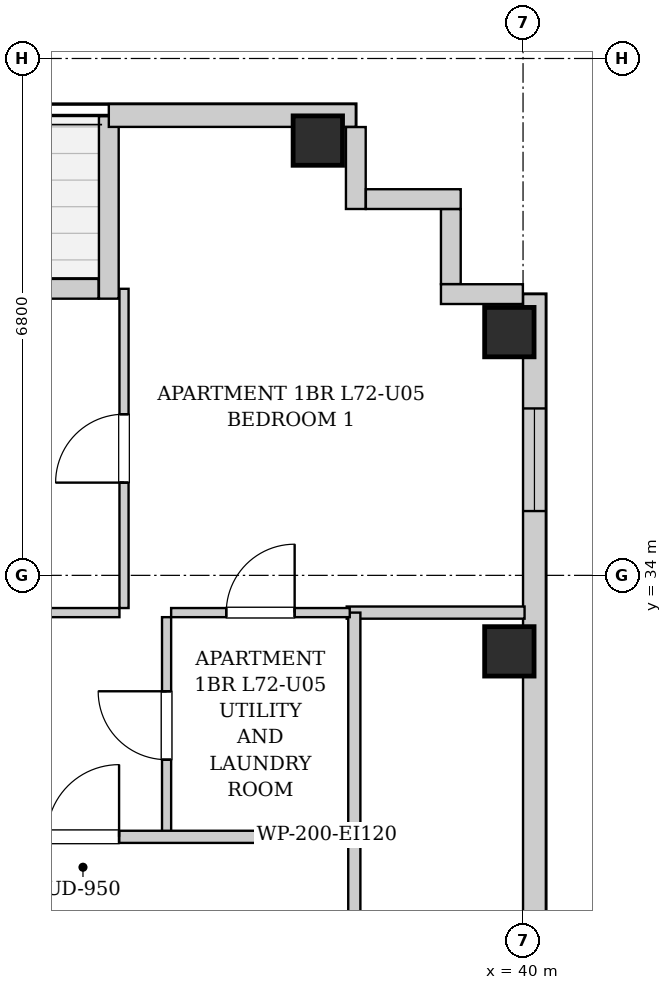
"""IFC4 building model, lengths in metres.
Left out: names, types, materials, properties, quantities, classifications, styles, units other than length and angle.
Written with IfcOpenShell. Run it as: python <this file> out.ifc"""

import sys

from ifc_helpers import new_model, si_unit, direction, frame, frame_2d, origin, origin_2d, place, context, subcontext, project, spatial, rectangle, extrude, element, fill, save


model = new_model("IFC4")
c1 = context("Model", 3, precision=1e-05, world=origin(), true_north=direction((0.0, 1.0)))
c2 = subcontext(c1, "Body", "Model", "MODEL_VIEW")
j1 = project(units=[si_unit("LENGTHUNIT", "METRE"), si_unit("PLANEANGLEUNIT", "RADIAN")], contexts=[c1])
p1 = place(None, origin())
s1 = spatial("IfcSite", under=j1, at=p1, CompositionType="ELEMENT")
p2 = place(p1, origin())
s2 = spatial("IfcBuilding", under=s1, at=p2, CompositionType="ELEMENT")
p3 = place(p2, frame((0.0, 0.0, 247.9)))
s3 = spatial("IfcBuildingStorey", under=s2, at=p3, CompositionType="ELEMENT", Elevation=247.9)
for number, where, z_axis, x_axis in (
    (1, (37.3, 39.72, 0.0), (0.0, 0.0, 1.0), (1.0, 0.0, 0.0)),
    (2, (39.82, 33.0, 0.0), (0.0, 0.0, 1.0), (1.0, 0.0, 0.0)),
    (3, (39.82, 37.2, 0.0), (0.0, 0.0, 1.0), (1.0, 0.0, 0.0)),
):
    element("IfcColumn", number, at=place(p3, frame(where, z_axis=z_axis, x_axis=x_axis)), inside=s3, PredefinedType="COLUMN", context=c2, shape_type="SweptSolid", body=[
        extrude(rectangle(XDim=0.65, YDim=0.65, at=origin_2d()), origin(), (0.0, 0.0, 1.0), 3.4),
    ])
p4 = place(p3, frame((30.084, 37.77, 0.0), z_axis=(0.0, 0.0, 1.0), x_axis=(1.0, 0.0, 0.0)))
e4 = element("IfcWall", 4, at=p4, inside=s3, PredefinedType="SOLIDWALL", context=c2, shape_type="SweptSolid", body=[
    extrude(rectangle(XDim=4.332, YDim=0.26, at=frame_2d((2.166, 0.0))), origin(), (0.0, 0.0, 1.0), 3.14),
])
p5 = place(p4, frame((1.616, 0.0, 0.0)))
e5 = element("IfcOpeningElement", 5, at=p5, cuts=e4, PredefinedType="OPENING", context=c2, shape_type="SweptSolid", body=[
    extrude(rectangle(XDim=1.1, YDim=2.0, at=frame_2d((0.55, 1.0))), frame((0.0, 0.14, 0.0), z_axis=(0.0, -1.0, 0.0), x_axis=(1.0, 0.0, 0.0)), (0.0, 0.0, 1.0), 0.28),
])
p6 = place(p4, frame((0.606, 0.0, 0.55)))
e6 = element("IfcOpeningElement", 6, at=p6, cuts=e4, PredefinedType="OPENING", context=c2, shape_type="SweptSolid", body=[
    extrude(rectangle(XDim=0.85, YDim=1.2, at=frame_2d((0.425, 0.6))), frame((0.0, 0.14, 0.0), z_axis=(0.0, -1.0, 0.0), x_axis=(1.0, 0.0, 0.0)), (0.0, 0.0, 1.0), 0.28),
])
p7 = place(p3, frame((34.55, 37.64, 0.0), z_axis=(0.0, 0.0, 1.0), x_axis=(0.0, 1.0, 0.0)))
e7 = element("IfcWall", 7, at=p7, inside=s3, PredefinedType="SOLIDWALL", context=c2, shape_type="SweptSolid", body=[
    extrude(rectangle(XDim=2.4, YDim=0.26, at=frame_2d((1.2, 0.0))), origin(), (0.0, 0.0, 1.0), 3.14),
])
p8 = place(p3, frame((34.55, 40.05, 0.0), z_axis=(0.0, 0.0, 1.0), x_axis=(1.0, 0.0, 0.0)))
e8 = element("IfcWall", 8, at=p8, inside=s3, PredefinedType="SOLIDWALL", context=c2, shape_type="SweptSolid", body=[
    extrude(rectangle(XDim=3.25, YDim=0.3, at=frame_2d((1.625, 0.0))), origin(), (0.0, 0.0, 1.0), 3.14),
])
p9 = place(p3, frame((40.15, 37.7, 0.0), z_axis=(0.0, 0.0, 1.0), x_axis=(0.0, -1.0, 0.0)))
e9 = element("IfcWall", 9, at=p9, inside=s3, PredefinedType="SOLIDWALL", context=c2, shape_type="SweptSolid", body=[
    extrude(rectangle(XDim=31.4, YDim=0.3, at=frame_2d((15.7, 0.0))), origin(), (0.0, 0.0, 1.0), 3.14),
])
p10 = place(p9, frame((28.546, 0.0, 0.55)))
e10 = element("IfcOpeningElement", 10, at=p10, cuts=e9, PredefinedType="OPENING", context=c2, shape_type="SweptSolid", body=[
    extrude(rectangle(XDim=1.35, YDim=1.2, at=frame_2d((0.675, 0.6))), frame((0.0, 0.16, 0.0), z_axis=(0.0, -1.0, 0.0), x_axis=(1.0, 0.0, 0.0)), (0.0, 0.0, 1.0), 0.32),
])
p11 = place(p9, frame((1.504, 0.0, 0.55)))
e11 = element("IfcOpeningElement", 11, at=p11, cuts=e9, PredefinedType="OPENING", context=c2, shape_type="SweptSolid", body=[
    extrude(rectangle(XDim=1.35, YDim=1.2, at=frame_2d((0.675, 0.6))), frame((0.0, 0.16, 0.0), z_axis=(0.0, -1.0, 0.0), x_axis=(1.0, 0.0, 0.0)), (0.0, 0.0, 1.0), 0.32),
])
p12 = place(p9, frame((19.683, 0.0, 0.55)))
e12 = element("IfcOpeningElement", 12, at=p12, cuts=e9, PredefinedType="OPENING", context=c2, shape_type="SweptSolid", body=[
    extrude(rectangle(XDim=1.35, YDim=1.2, at=frame_2d((0.675, 0.6))), frame((0.0, 0.16, 0.0), z_axis=(0.0, -1.0, 0.0), x_axis=(1.0, 0.0, 0.0)), (0.0, 0.0, 1.0), 0.32),
])
p13 = place(p9, frame((10.367, 0.0, 0.55)))
e13 = element("IfcOpeningElement", 13, at=p13, cuts=e9, PredefinedType="OPENING", context=c2, shape_type="SweptSolid", body=[
    extrude(rectangle(XDim=1.35, YDim=1.2, at=frame_2d((0.675, 0.6))), frame((0.0, 0.16, 0.0), z_axis=(0.0, -1.0, 0.0), x_axis=(1.0, 0.0, 0.0)), (0.0, 0.0, 1.0), 0.32),
])
p14 = place(p3, frame((37.8, 39.898, 0.0), z_axis=(0.0, 0.0, 1.0), x_axis=(0.0, -1.0, 0.0)))
e14 = element("IfcWall", 14, at=p14, inside=s3, PredefinedType="SOLIDWALL", context=c2, shape_type="SweptSolid", body=[
    extrude(rectangle(XDim=1.078, YDim=0.26, at=frame_2d((0.539, 0.0))), origin(), (0.0, 0.0, 1.0), 3.14),
])
p15 = place(p3, frame((37.932, 38.95, 0.0), z_axis=(0.0, 0.0, 1.0), x_axis=(1.0, 0.0, 0.0)))
e15 = element("IfcWall", 15, at=p15, inside=s3, PredefinedType="SOLIDWALL", context=c2, shape_type="SweptSolid", body=[
    extrude(rectangle(XDim=1.248, YDim=0.26, at=frame_2d((0.624, 0.0))), origin(), (0.0, 0.0, 1.0), 3.14),
])
p16 = place(p3, frame((39.05, 38.818, 0.0), z_axis=(0.0, 0.0, 1.0), x_axis=(0.0, -1.0, 0.0)))
e16 = element("IfcWall", 16, at=p16, inside=s3, PredefinedType="SOLIDWALL", context=c2, shape_type="SweptSolid", body=[
    extrude(rectangle(XDim=0.986, YDim=0.26, at=frame_2d((0.493, 0.0))), origin(), (0.0, 0.0, 1.0), 3.14),
])
p17 = place(p3, frame((38.92, 37.7, 0.0), z_axis=(0.0, 0.0, 1.0), x_axis=(1.0, 0.0, 0.0)))
e17 = element("IfcWall", 17, at=p17, inside=s3, PredefinedType="SOLIDWALL", context=c2, shape_type="SweptSolid", body=[
    extrude(rectangle(XDim=1.078, YDim=0.26, at=frame_2d((0.539, 0.0))), origin(), (0.0, 0.0, 1.0), 3.14),
])
p18 = place(p3, frame((37.78, 28.98, 0.0), z_axis=(0.0, 0.0, 1.0), x_axis=(0.0, 1.0, 0.0)))
e18 = element("IfcWall", 18, at=p18, inside=s3, PredefinedType="PARTITIONING", context=c2, shape_type="SweptSolid", body=[
    extrude(rectangle(XDim=1.58, YDim=0.16, at=frame_2d((0.79, 0.0))), origin(), (0.0, 0.0, 1.0), 3.14),
])
p19 = place(p3, frame((37.68, 33.51, 0.0), z_axis=(0.0, 0.0, 1.0), x_axis=(1.0, 0.0, 0.0)))
e19 = element("IfcWall", 19, at=p19, inside=s3, PredefinedType="PARTITIONING", context=c2, shape_type="SweptSolid", body=[
    extrude(rectangle(XDim=2.34, YDim=0.16, at=frame_2d((1.17, 0.0))), origin(), (0.0, 0.0, 1.0), 3.14),
])
p20 = place(p3, frame((37.78, 30.6, 0.0), z_axis=(0.0, 0.0, 1.0), x_axis=(0.0, 1.0, 0.0)))
e20 = element("IfcWall", 20, at=p20, inside=s3, PredefinedType="PARTITIONING", context=c2, shape_type="SweptSolid", body=[
    extrude(rectangle(XDim=2.91, YDim=0.16, at=frame_2d((1.455, 0.0))), origin(), (0.0, 0.0, 1.0), 3.14),
])
p21 = place(p3, frame((35.31, 30.6, 0.0), z_axis=(0.0, 0.0, 1.0), x_axis=(0.0, 1.0, 0.0)))
e21 = element("IfcWall", 21, at=p21, inside=s3, PredefinedType="PARTITIONING", context=c2, shape_type="SweptSolid", body=[
    extrude(rectangle(XDim=2.85, YDim=0.12, at=frame_2d((1.425, 0.0))), origin(), (0.0, 0.0, 1.0), 3.14),
])
p22 = place(p21, frame((0.975, 0.0, 0.0)))
e22 = element("IfcOpeningElement", 22, at=p22, cuts=e21, PredefinedType="OPENING", context=c2, shape_type="SweptSolid", body=[
    extrude(rectangle(XDim=0.9, YDim=2.05, at=frame_2d((0.45, 1.025))), frame((0.0, 0.07, 0.0), z_axis=(0.0, -1.0, 0.0), x_axis=(1.0, 0.0, 0.0)), (0.0, 0.0, 1.0), 0.14),
])
p23 = place(p3, frame((31.8, 33.51, 0.0), z_axis=(0.0, 0.0, 1.0), x_axis=(1.0, 0.0, 0.0)))
e23 = element("IfcWall", 23, at=p23, inside=s3, PredefinedType="PARTITIONING", context=c2, shape_type="SweptSolid", body=[
    extrude(rectangle(XDim=2.89, YDim=0.12, at=frame_2d((1.445, 0.0))), origin(), (0.0, 0.0, 1.0), 3.14),
])
p24 = place(p23, frame((0.995, 0.0, 0.0)))
e24 = element("IfcOpeningElement", 24, at=p24, cuts=e23, PredefinedType="OPENING", context=c2, shape_type="SweptSolid", body=[
    extrude(rectangle(XDim=0.9, YDim=2.05, at=frame_2d((0.45, 1.025))), frame((0.0, 0.07, 0.0), z_axis=(0.0, -1.0, 0.0), x_axis=(1.0, 0.0, 0.0)), (0.0, 0.0, 1.0), 0.14),
])
p25 = place(p3, frame((35.37, 33.51, 0.0), z_axis=(0.0, 0.0, 1.0), x_axis=(1.0, 0.0, 0.0)))
e25 = element("IfcWall", 25, at=p25, inside=s3, PredefinedType="PARTITIONING", context=c2, shape_type="SweptSolid", body=[
    extrude(rectangle(XDim=2.35, YDim=0.12, at=frame_2d((1.175, 0.0))), origin(), (0.0, 0.0, 1.0), 3.14),
])
p26 = place(p25, frame((0.725, 0.0, 0.0)))
e26 = element("IfcOpeningElement", 26, at=p26, cuts=e25, PredefinedType="OPENING", context=c2, shape_type="SweptSolid", body=[
    extrude(rectangle(XDim=0.9, YDim=2.05, at=frame_2d((0.45, 1.025))), frame((0.0, 0.07, 0.0), z_axis=(0.0, -1.0, 0.0), x_axis=(1.0, 0.0, 0.0)), (0.0, 0.0, 1.0), 0.14),
])
p27 = place(p3, frame((34.75, 33.57, 0.0), z_axis=(0.0, 0.0, 1.0), x_axis=(0.0, 1.0, 0.0)))
e27 = element("IfcWall", 27, at=p27, inside=s3, PredefinedType="PARTITIONING", context=c2, shape_type="SweptSolid", body=[
    extrude(rectangle(XDim=4.2, YDim=0.12, at=frame_2d((2.1, 0.0))), origin(), (0.0, 0.0, 1.0), 3.14),
])
p28 = place(p27, frame((1.65, 0.0, 0.0)))
e28 = element("IfcOpeningElement", 28, at=p28, cuts=e27, PredefinedType="OPENING", context=c2, shape_type="SweptSolid", body=[
    extrude(rectangle(XDim=0.9, YDim=2.05, at=frame_2d((0.45, 1.025))), frame((0.0, 0.07, 0.0), z_axis=(0.0, -1.0, 0.0), x_axis=(1.0, 0.0, 0.0)), (0.0, 0.0, 1.0), 0.14),
])
p29 = place(p3, frame((13.15, 30.56, 0.0), z_axis=(0.0, 0.0, 1.0), x_axis=(1.0, 0.0, 0.0)))
e29 = element("IfcWall", 29, at=p29, inside=s3, PredefinedType="PARTITIONING", context=c2, shape_type="SweptSolid", body=[
    extrude(rectangle(XDim=24.6, YDim=0.16, at=frame_2d((12.3, 0.0))), origin(), (0.0, 0.0, 1.0), 3.14),
])
p30 = place(p29, frame((3.165, 0.0, 0.0)))
e30 = element("IfcOpeningElement", 30, at=p30, cuts=e29, PredefinedType="OPENING", context=c2, shape_type="SweptSolid", body=[
    extrude(rectangle(XDim=0.95, YDim=2.1, at=frame_2d((0.475, 1.05))), frame((0.0, 0.09, 0.0), z_axis=(0.0, -1.0, 0.0), x_axis=(1.0, 0.0, 0.0)), (0.0, 0.0, 1.0), 0.18),
])
p31 = place(p29, frame((20.585, 0.0, 0.0)))
e31 = element("IfcOpeningElement", 31, at=p31, cuts=e29, PredefinedType="OPENING", context=c2, shape_type="SweptSolid", body=[
    extrude(rectangle(XDim=0.95, YDim=2.1, at=frame_2d((0.475, 1.05))), frame((0.0, 0.09, 0.0), z_axis=(0.0, -1.0, 0.0), x_axis=(1.0, 0.0, 0.0)), (0.0, 0.0, 1.0), 0.18),
])
p32 = place(p22, origin())
e32 = element("IfcDoor", 32, at=p32, inside=s3, OperationType="SINGLE_SWING_RIGHT", PredefinedType="DOOR", context=c2, shape_type="SweptSolid", body=[
    extrude(rectangle(XDim=0.9, YDim=2.05, at=frame_2d((0.45, 1.025))), frame((0.0, 0.025, 0.0), z_axis=(0.0, -1.0, 0.0), x_axis=(1.0, 0.0, 0.0)), (0.0, 0.0, 1.0), 0.05),
])
fill(e22, e32)
p33 = place(p26, origin())
e33 = element("IfcDoor", 33, at=p33, inside=s3, OperationType="SINGLE_SWING_RIGHT", PredefinedType="DOOR", context=c2, shape_type="SweptSolid", body=[
    extrude(rectangle(XDim=0.9, YDim=2.05, at=frame_2d((0.45, 1.025))), frame((0.0, 0.025, 0.0), z_axis=(0.0, -1.0, 0.0), x_axis=(1.0, 0.0, 0.0)), (0.0, 0.0, 1.0), 0.05),
])
fill(e26, e33)
p34 = place(p28, origin())
e34 = element("IfcDoor", 34, at=p34, inside=s3, OperationType="SINGLE_SWING_LEFT", PredefinedType="DOOR", context=c2, shape_type="SweptSolid", body=[
    extrude(rectangle(XDim=0.9, YDim=2.05, at=frame_2d((0.45, 1.025))), frame((0.0, 0.025, 0.0), z_axis=(0.0, -1.0, 0.0), x_axis=(1.0, 0.0, 0.0)), (0.0, 0.0, 1.0), 0.05),
])
fill(e28, e34)
p35 = place(p31, origin())
e35 = element("IfcDoor", 35, at=p35, inside=s3, OperationType="SINGLE_SWING_RIGHT", PredefinedType="DOOR", context=c2, shape_type="SweptSolid", body=[
    extrude(rectangle(XDim=0.95, YDim=2.1, at=frame_2d((0.475, 1.05))), frame((0.0, 0.025, 0.0), z_axis=(0.0, -1.0, 0.0), x_axis=(1.0, 0.0, 0.0)), (0.0, 0.0, 1.0), 0.05),
])
fill(e31, e35)
p36 = place(p11, origin())
e36 = element("IfcWindow", 36, at=p36, inside=s3, PartitioningType="SINGLE_PANEL", PredefinedType="WINDOW", context=c2, shape_type="SweptSolid", body=[
    extrude(rectangle(XDim=1.35, YDim=1.2, at=frame_2d((0.675, 0.6))), frame((0.0, 0.03, 0.0), z_axis=(0.0, -1.0, 0.0), x_axis=(1.0, 0.0, 0.0)), (0.0, 0.0, 1.0), 0.06),
])
fill(e11, e36)
save(model, sys.argv[1])
